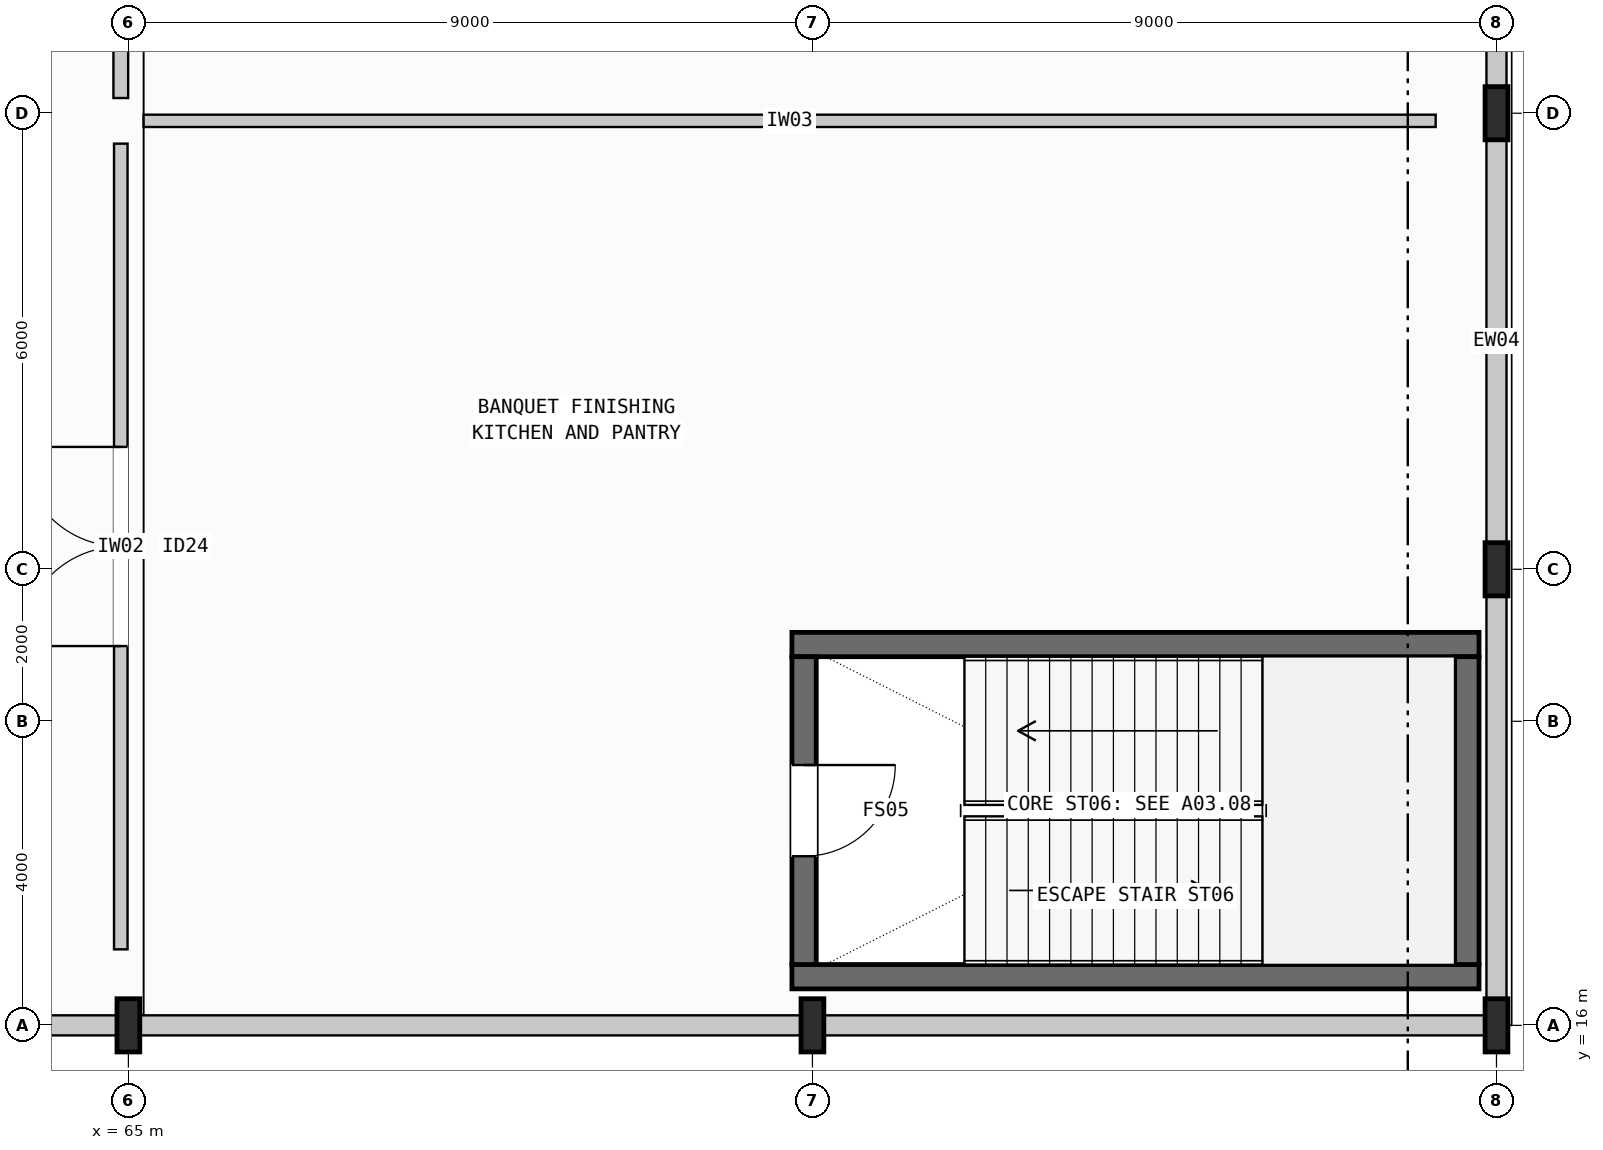
"""IFC4 building model, lengths in metres.
Left out: names, types, materials, properties, quantities, classifications, styles, units other than length and angle.
Written with IfcOpenShell. Run it as: python <this file> out.ifc"""

import sys

from ifc_helpers import new_model, si_unit, direction, frame, frame_2d, origin, origin_2d, place, context, subcontext, project, spatial, rectangle, i_section, extrude, element, fill, save


model = new_model("IFC4")
c1 = context("Model", 3, precision=1e-05, world=origin(), true_north=direction((0.0, 1.0)))
c2 = subcontext(c1, "Body", "Model", "MODEL_VIEW")
j1 = project(units=[si_unit("LENGTHUNIT", "METRE"), si_unit("PLANEANGLEUNIT", "RADIAN")], contexts=[c1])
p1 = place(None, origin())
s1 = spatial("IfcSite", under=j1, at=p1, CompositionType="ELEMENT")
p2 = place(p1, origin())
s2 = spatial("IfcBuilding", under=s1, at=p2, CompositionType="ELEMENT")
p3 = place(p2, frame((0.0, 0.0, 11.4)))
s3 = spatial("IfcBuildingStorey", under=s2, at=p3, CompositionType="ELEMENT", Elevation=11.4)
for number, where, z_axis, x_axis in (
    (1, (65.0, 16.0, 0.0), (0.0, 0.0, 1.0), (1.0, 0.0, 0.0)),
    (2, (74.0, 16.0, 0.0), (0.0, 0.0, 1.0), (1.0, 0.0, 0.0)),
    (3, (83.0, 16.0, 0.0), (0.0, 0.0, 1.0), (1.0, 0.0, 0.0)),
    (4, (83.0, 22.0, 0.0), (0.0, 0.0, 1.0), (1.0, 0.0, 0.0)),
    (5, (83.0, 28.0, 0.0), (0.0, 0.0, 1.0), (1.0, 0.0, 0.0)),
):
    element("IfcColumn", number, at=place(p3, frame(where, z_axis=z_axis, x_axis=x_axis)), inside=s3, PredefinedType="COLUMN", context=c2, shape_type="SweptSolid", body=[
        extrude(i_section(OverallWidth=0.3, OverallDepth=0.7, WebThickness=0.017, FlangeThickness=0.032, FilletRadius=0.027, at=origin_2d()), origin(), (0.0, 0.0, 1.0), 5.4),
    ])
for number, where, z_axis, x_axis in (
    (6, (73.73, 16.64, 0.0), (0.0, 0.0, 1.0), (1.0, 0.0, 0.0)),
    (7, (73.73, 21.01, 0.0), (0.0, 0.0, 1.0), (1.0, 0.0, 0.0)),
):
    element("IfcWall", number, at=place(p3, frame(where, z_axis=z_axis, x_axis=x_axis)), inside=s3, PredefinedType="SHEAR", context=c2, shape_type="SweptSolid", body=[
        extrude(rectangle(XDim=9.04, YDim=0.32, at=frame_2d((4.52, 0.0))), origin(), (0.0, 0.0, 1.0), 5.4),
    ])
p4 = place(p3, frame((73.89, 16.8, 0.0), z_axis=(0.0, 0.0, 1.0), x_axis=(0.0, 1.0, 0.0)))
e8 = element("IfcWall", 8, at=p4, inside=s3, PredefinedType="SHEAR", context=c2, shape_type="SweptSolid", body=[
    extrude(rectangle(XDim=4.05, YDim=0.32, at=frame_2d((2.025, 0.0))), origin(), (0.0, 0.0, 1.0), 5.4),
])
p5 = place(p4, frame((1.425, 0.0, 0.0)))
e9 = element("IfcOpeningElement", 9, at=p5, cuts=e8, PredefinedType="OPENING", context=c2, shape_type="SweptSolid", body=[
    extrude(rectangle(XDim=1.2, YDim=2.2, at=frame_2d((0.6, 1.1))), frame((0.0, 0.17, 0.0), z_axis=(0.0, -1.0, 0.0), x_axis=(1.0, 0.0, 0.0)), (0.0, 0.0, 1.0), 0.34),
])
p6 = place(p3, frame((82.61, 16.8, 0.0), z_axis=(0.0, 0.0, 1.0), x_axis=(0.0, 1.0, 0.0)))
e10 = element("IfcWall", 10, at=p6, inside=s3, PredefinedType="SHEAR", context=c2, shape_type="SweptSolid", body=[
    extrude(rectangle(XDim=4.05, YDim=0.32, at=frame_2d((2.025, 0.0))), origin(), (0.0, 0.0, 1.0), 5.4),
])
p7 = place(p3, frame((56.146, 16.0, 0.0), z_axis=(0.0, 0.0, 1.0), x_axis=(1.0, 0.0, 0.0)))
e11 = element("IfcWall", 11, at=p7, inside=s3, PredefinedType="STANDARD", context=c2, shape_type="SweptSolid", body=[
    extrude(rectangle(XDim=8.708, YDim=0.264, at=frame_2d((4.354, 0.0))), origin(), (0.0, 0.0, 1.0), 4.438),
])
p8 = place(p7, frame((2.929, 0.0, 1.0)))
e12 = element("IfcOpeningElement", 12, at=p8, cuts=e11, PredefinedType="OPENING", context=c2, shape_type="SweptSolid", body=[
    extrude(rectangle(XDim=2.85, YDim=2.25, at=frame_2d((1.425, 1.125))), frame((0.0, 0.142, 0.0), z_axis=(0.0, -1.0, 0.0), x_axis=(1.0, 0.0, 0.0)), (0.0, 0.0, 1.0), 0.284),
])
for number, where, z_axis, x_axis in (
    (13, (65.146, 16.0, 0.0), (0.0, 0.0, 1.0), (1.0, 0.0, 0.0)),
    (14, (74.146, 16.0, 0.0), (0.0, 0.0, 1.0), (1.0, 0.0, 0.0)),
):
    element("IfcWall", number, at=place(p3, frame(where, z_axis=z_axis, x_axis=x_axis)), inside=s3, PredefinedType="STANDARD", context=c2, shape_type="SweptSolid", body=[
        extrude(rectangle(XDim=8.708, YDim=0.264, at=frame_2d((4.354, 0.0))), origin(), (0.0, 0.0, 1.0), 4.438),
    ])
for number, where, z_axis, x_axis in (
    (15, (83.0, 16.346, 0.0), (0.0, 0.0, 1.0), (0.0, 1.0, 0.0)),
    (16, (83.0, 22.346, 0.0), (0.0, 0.0, 1.0), (0.0, 1.0, 0.0)),
):
    element("IfcWall", number, at=place(p3, frame(where, z_axis=z_axis, x_axis=x_axis)), inside=s3, PredefinedType="STANDARD", context=c2, shape_type="SweptSolid", body=[
        extrude(rectangle(XDim=5.308, YDim=0.264, at=frame_2d((2.654, 0.0))), origin(), (0.0, 0.0, 1.0), 4.538),
    ])
p9 = place(p3, frame((83.0, 28.346, 0.0), z_axis=(0.0, 0.0, 1.0), x_axis=(0.0, 1.0, 0.0)))
e17 = element("IfcWall", 17, at=p9, inside=s3, PredefinedType="STANDARD", context=c2, shape_type="SweptSolid", body=[
    extrude(rectangle(XDim=5.308, YDim=0.264, at=frame_2d((2.654, 0.0))), origin(), (0.0, 0.0, 1.0), 4.538),
])
p10 = place(p9, frame((1.929, 0.0, 1.0)))
e18 = element("IfcOpeningElement", 18, at=p10, cuts=e17, PredefinedType="OPENING", context=c2, shape_type="SweptSolid", body=[
    extrude(rectangle(XDim=1.45, YDim=2.2, at=frame_2d((0.725, 1.1))), frame((0.0, 0.142, 0.0), z_axis=(0.0, -1.0, 0.0), x_axis=(1.0, 0.0, 0.0)), (0.0, 0.0, 1.0), 0.284),
])
p11 = place(p3, frame((64.9, 28.2, 0.0), z_axis=(0.0, 0.0, 1.0), x_axis=(0.0, 1.0, 0.0)))
e19 = element("IfcWall", 19, at=p11, inside=s3, PredefinedType="MOVABLE", context=c2, shape_type="SweptSolid", body=[
    extrude(rectangle(XDim=16.6, YDim=0.194, at=frame_2d((8.3, 0.0))), origin(), (0.0, 0.0, 1.0), 4.4),
])
p12 = place(p11, frame((7.05, 0.0, 0.0)))
e20 = element("IfcOpeningElement", 20, at=p12, cuts=e19, PredefinedType="OPENING", context=c2, shape_type="SweptSolid", body=[
    extrude(rectangle(XDim=2.5, YDim=2.42, at=frame_2d((1.25, 1.21))), frame((0.0, 0.107, 0.0), z_axis=(0.0, -1.0, 0.0), x_axis=(1.0, 0.0, 0.0)), (0.0, 0.0, 1.0), 0.214),
])
p13 = place(p3, frame((64.9, 17.0, 0.0), z_axis=(0.0, 0.0, 1.0), x_axis=(0.0, 1.0, 0.0)))
e21 = element("IfcWall", 21, at=p13, inside=s3, PredefinedType="PARTITIONING", context=c2, shape_type="SweptSolid", body=[
    extrude(rectangle(XDim=10.6, YDim=0.178, at=frame_2d((5.3, 0.0))), origin(), (0.0, 0.0, 1.0), 4.4),
])
p14 = place(p13, frame((3.99, 0.0, 0.0)))
e22 = element("IfcOpeningElement", 22, at=p14, cuts=e21, PredefinedType="OPENING", context=c2, shape_type="SweptSolid", body=[
    extrude(rectangle(XDim=2.62, YDim=2.48, at=frame_2d((1.31, 1.24))), frame((0.0, 0.099, 0.0), z_axis=(0.0, -1.0, 0.0), x_axis=(1.0, 0.0, 0.0)), (0.0, 0.0, 1.0), 0.198),
])
p15 = place(p3, frame((65.2, 27.9, 0.0), z_axis=(0.0, 0.0, 1.0), x_axis=(1.0, 0.0, 0.0)))
e23 = element("IfcWall", 23, at=p15, inside=s3, PredefinedType="PARTITIONING", context=c2, shape_type="SweptSolid", body=[
    extrude(rectangle(XDim=17.0, YDim=0.162, at=frame_2d((8.5, 0.0))), origin(), (0.0, 0.0, 1.0), 4.4),
])
p16 = place(p5, frame((1.2, 0.0, 0.0), z_axis=(0.0, 0.0, 1.0), x_axis=(-1.0, 0.0, 0.0)))
e24 = element("IfcDoor", 24, at=p16, inside=s3, OperationType="SINGLE_SWING_LEFT", PredefinedType="DOOR", context=c2, shape_type="SweptSolid", body=[
    extrude(rectangle(XDim=1.2, YDim=2.2, at=frame_2d((0.6, 1.1))), frame((0.0, 0.025, 0.0), z_axis=(0.0, -1.0, 0.0), x_axis=(1.0, 0.0, 0.0)), (0.0, 0.0, 1.0), 0.05),
])
fill(e9, e24)
p17 = place(p14, origin())
e25 = element("IfcDoor", 25, at=p17, inside=s3, OperationType="DOUBLE_DOOR_SINGLE_SWING", PredefinedType="DOOR", context=c2, shape_type="SweptSolid", body=[
    extrude(rectangle(XDim=2.62, YDim=2.48, at=frame_2d((1.31, 1.24))), frame((0.0, 0.025, 0.0), z_axis=(0.0, -1.0, 0.0), x_axis=(1.0, 0.0, 0.0)), (0.0, 0.0, 1.0), 0.05),
])
fill(e22, e25)
save(model, sys.argv[1])
